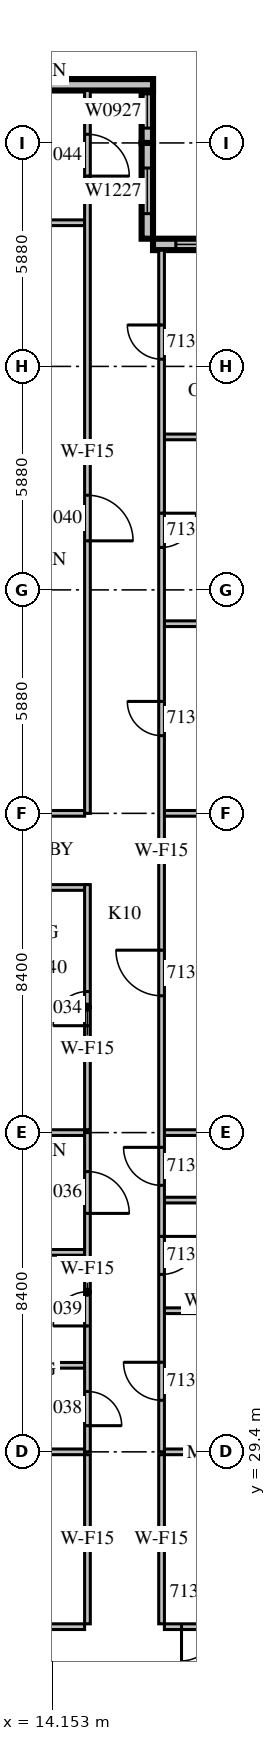
"""IFC4 building model, lengths in metres.
Left out: names, types, materials, properties, quantities, classifications, styles, units other than length and angle.
Written with IfcOpenShell. Run it as: python <this file> out.ifc"""

import sys

from ifc_helpers import new_model, si_unit, direction, frame, frame_2d, origin, place, context, subcontext, project, spatial, rectangle, extrude, source, transform, mapped, element, fill, save


model = new_model("IFC4")
c1 = context("Model", 3, precision=1e-05, world=origin(), true_north=direction((0.0, 1.0)))
c2 = subcontext(c1, "Body", "Model", "MODEL_VIEW")
j1 = project(units=[si_unit("LENGTHUNIT", "METRE"), si_unit("PLANEANGLEUNIT", "RADIAN")], contexts=[c1])
p1 = place(None, origin())
s1 = spatial("IfcSite", under=j1, at=p1, CompositionType="ELEMENT")
p2 = place(p1, origin())
s2 = spatial("IfcBuilding", under=s1, at=p2, CompositionType="ELEMENT")
p3 = place(p2, frame((0.0, 0.0, 65.7)))
s3 = spatial("IfcBuildingStorey", under=s2, at=p3, CompositionType="ELEMENT", Elevation=65.7)
m1 = source(origin(), c2, "Body", "SweptSolid", [
    extrude(rectangle(XDim=4.2, YDim=0.3, at=frame_2d((2.1, 0.0))), origin(), (0.0, 0.0, 1.0), 3.8),
])
p4 = place(p3, frame((21.0, 61.17, 0.0), z_axis=(0.0, 0.0, 1.0), x_axis=(-1.0, 0.0, 0.0)))
e1 = element("IfcWall", 1, at=p4, inside=s3, PredefinedType="STANDARD", context=c2, shape_type="MappedRepresentation", body=[
    mapped(m1, transform((0.0, 0.0, 0.0), scale=1.0)),
])
m2 = source(origin(), c2, "Body", "SweptSolid", [
    extrude(rectangle(XDim=3.0, YDim=2.7, at=frame_2d((1.5, 1.35))), frame((0.0, 0.16, 0.0), z_axis=(0.0, -1.0, 0.0), x_axis=(1.0, 0.0, 0.0)), (0.0, 0.0, 1.0), 0.32),
])
p5 = place(p4, frame((0.6, 0.0, 0.6)))
e2 = element("IfcOpeningElement", 2, at=p5, cuts=e1, PredefinedType="OPENING", context=c2, shape_type="MappedRepresentation", body=[
    mapped(m2, transform((0.0, 0.0, 0.0), scale=1.0)),
])
m3 = source(origin(), c2, "Body", "SweptSolid", [
    extrude(rectangle(XDim=2.52, YDim=0.3, at=frame_2d((1.26, 0.0))), origin(), (0.0, 0.0, 1.0), 3.8),
])
p6 = place(p3, frame((16.65, 61.32, 0.0), z_axis=(0.0, 0.0, 1.0), x_axis=(0.0, 1.0, 0.0)))
e3 = element("IfcWall", 3, at=p6, inside=s3, PredefinedType="STANDARD", context=c2, shape_type="MappedRepresentation", body=[
    mapped(m3, transform((0.0, 0.0, 0.0), scale=1.0)),
])
m4 = source(origin(), c2, "Body", "SweptSolid", [
    extrude(rectangle(XDim=1.2, YDim=2.7, at=frame_2d((0.6, 1.35))), frame((0.0, 0.16, 0.0), z_axis=(0.0, -1.0, 0.0), x_axis=(1.0, 0.0, 0.0)), (0.0, 0.0, 1.0), 0.32),
])
p7 = place(p6, frame((0.66, 0.0, 0.6)))
e4 = element("IfcOpeningElement", 4, at=p7, cuts=e3, PredefinedType="OPENING", context=c2, shape_type="MappedRepresentation", body=[
    mapped(m4, transform((0.0, 0.0, 0.0), scale=1.0)),
])
m5 = source(origin(), c2, "Body", "SweptSolid", [
    extrude(rectangle(XDim=1.68, YDim=0.3, at=frame_2d((0.84, 0.0))), origin(), (0.0, 0.0, 1.0), 3.8),
])
p8 = place(p3, frame((16.65, 63.84, 0.0), z_axis=(0.0, 0.0, 1.0), x_axis=(0.0, 1.0, 0.0)))
e5 = element("IfcWall", 5, at=p8, inside=s3, PredefinedType="STANDARD", context=c2, shape_type="MappedRepresentation", body=[
    mapped(m5, transform((0.0, 0.0, 0.0), scale=1.0)),
])
m6 = source(origin(), c2, "Body", "SweptSolid", [
    extrude(rectangle(XDim=0.9, YDim=2.7, at=frame_2d((0.45, 1.35))), frame((0.0, 0.16, 0.0), z_axis=(0.0, -1.0, 0.0), x_axis=(1.0, 0.0, 0.0)), (0.0, 0.0, 1.0), 0.32),
])
p9 = place(p8, frame((0.39, 0.0, 0.6)))
e6 = element("IfcOpeningElement", 6, at=p9, cuts=e5, PredefinedType="OPENING", context=c2, shape_type="MappedRepresentation", body=[
    mapped(m6, transform((0.0, 0.0, 0.0), scale=1.0)),
])
m7 = source(origin(), c2, "Body", "SweptSolid", [
    extrude(rectangle(XDim=3.15, YDim=0.3, at=frame_2d((1.575, 0.0))), origin(), (0.0, 0.0, 1.0), 3.8),
])
p10 = place(p3, frame((16.8, 65.37, 0.0), z_axis=(0.0, 0.0, 1.0), x_axis=(-1.0, 0.0, 0.0)))
e7 = element("IfcWall", 7, at=p10, inside=s3, PredefinedType="STANDARD", context=c2, shape_type="MappedRepresentation", body=[
    mapped(m7, transform((0.0, 0.0, 0.0), scale=1.0)),
])
m8 = source(origin(), c2, "Body", "SweptSolid", [
    extrude(rectangle(XDim=11.925, YDim=0.15, at=frame_2d((5.963, 0.0))), origin(), (0.0, 0.0, 1.0), 3.8),
])
p11 = place(p3, frame((3.075, 24.8, 0.0), z_axis=(0.0, 0.0, 1.0), x_axis=(1.0, 0.0, 0.0)))
e8 = element("IfcWall", 8, at=p11, inside=s3, PredefinedType="PARTITIONING", context=c2, shape_type="MappedRepresentation", body=[
    mapped(m8, transform((0.0, 0.0, 0.0), scale=1.0)),
])
m9 = source(origin(), c2, "Body", "SweptSolid", [
    extrude(rectangle(XDim=0.9, YDim=2.1, at=frame_2d((0.45, 1.05))), frame((0.0, 0.085, 0.0), z_axis=(0.0, -1.0, 0.0), x_axis=(1.0, 0.0, 0.0)), (0.0, 0.0, 1.0), 0.17),
])
p12 = place(p11, frame((2.062, 0.0, 0.0)))
e9 = element("IfcOpeningElement", 9, at=p12, cuts=e8, PredefinedType="OPENING", context=c2, shape_type="MappedRepresentation", body=[
    mapped(m9, transform((0.0, 0.0, 0.0), scale=1.0)),
])
p13 = place(p11, frame((8.9, 0.0, 0.0)))
e10 = element("IfcOpeningElement", 10, at=p13, cuts=e8, PredefinedType="OPENING", context=c2, shape_type="MappedRepresentation", body=[
    mapped(m9, transform((0.0, 0.0, 0.0), scale=1.0)),
])
m10 = source(origin(), c2, "Body", "SweptSolid", [
    extrude(rectangle(XDim=3.6, YDim=0.15, at=frame_2d((1.8, 0.0))), origin(), (0.0, 0.0, 1.0), 3.8),
])
p14 = place(p3, frame((17.1, 24.8, 0.0), z_axis=(0.0, 0.0, 1.0), x_axis=(1.0, 0.0, 0.0)))
e11 = element("IfcWall", 11, at=p14, inside=s3, PredefinedType="PARTITIONING", context=c2, shape_type="MappedRepresentation", body=[
    mapped(m10, transform((0.0, 0.0, 0.0), scale=1.0)),
])
p15 = place(p14, frame((0.45, 0.0, 0.0)))
e12 = element("IfcOpeningElement", 12, at=p15, cuts=e11, PredefinedType="OPENING", context=c2, shape_type="MappedRepresentation", body=[
    mapped(m9, transform((0.0, 0.0, 0.0), scale=1.0)),
])
m11 = source(origin(), c2, "Body", "SweptSolid", [
    extrude(rectangle(XDim=4.45, YDim=0.15, at=frame_2d((2.225, 0.0))), origin(), (0.0, 0.0, 1.0), 3.8),
])
for number, where, z_axis, x_axis in (
    (13, (15.075, 24.875, 0.0), (0.0, 0.0, 1.0), (0.0, 1.0, 0.0)),
    (14, (17.025, 29.325, 0.0), (0.0, 0.0, 1.0), (0.0, -1.0, 0.0)),
):
    element("IfcWall", number, at=place(p3, frame(where, z_axis=z_axis, x_axis=x_axis)), inside=s3, PredefinedType="PARTITIONING", context=c2, shape_type="MappedRepresentation", body=[
        mapped(m11, transform((0.0, 0.0, 0.0), scale=1.0)),
    ])
m12 = source(origin(), c2, "Body", "SweptSolid", [
    extrude(rectangle(XDim=3.901, YDim=0.15, at=frame_2d((1.95, 0.0))), origin(), (0.0, 0.0, 1.0), 3.8),
])
p16 = place(p3, frame((15.0, 29.4, 0.0), z_axis=(0.0, 0.0, 1.0), x_axis=(-1.0, 0.0, 0.0)))
e15 = element("IfcWall", 15, at=p16, inside=s3, PredefinedType="PARTITIONING", context=c2, shape_type="MappedRepresentation", body=[
    mapped(m12, transform((0.0, 0.0, 0.0), scale=1.0)),
])
m13 = source(origin(), c2, "Body", "SweptSolid", [
    extrude(rectangle(XDim=2.701, YDim=0.15, at=frame_2d((1.351, 0.0))), origin(), (0.0, 0.0, 1.0), 3.8),
])
p17 = place(p3, frame((19.801, 29.4, 0.0), z_axis=(0.0, 0.0, 1.0), x_axis=(-1.0, 0.0, 0.0)))
e16 = element("IfcWall", 16, at=p17, inside=s3, PredefinedType="PARTITIONING", context=c2, shape_type="MappedRepresentation", body=[
    mapped(m13, transform((0.0, 0.0, 0.0), scale=1.0)),
])
m14 = source(origin(), c2, "Body", "SweptSolid", [
    extrude(rectangle(XDim=3.975, YDim=0.15, at=frame_2d((1.988, 0.0))), origin(), (0.0, 0.0, 1.0), 3.8),
])
p18 = place(p3, frame((15.075, 44.25, 0.0), z_axis=(0.0, 0.0, 1.0), x_axis=(-1.0, 0.0, 0.0)))
e17 = element("IfcWall", 17, at=p18, inside=s3, PredefinedType="PARTITIONING", context=c2, shape_type="MappedRepresentation", body=[
    mapped(m14, transform((0.0, 0.0, 0.0), scale=1.0)),
])
m15 = source(origin(), c2, "Body", "SweptSolid", [
    extrude(rectangle(XDim=6.45, YDim=0.15, at=frame_2d((3.225, 0.0))), origin(), (0.0, 0.0, 1.0), 3.8),
])
p19 = place(p3, frame((15.075, 37.875, 0.0), z_axis=(0.0, 0.0, 1.0), x_axis=(0.0, 1.0, 0.0)))
e18 = element("IfcWall", 18, at=p19, inside=s3, PredefinedType="PARTITIONING", context=c2, shape_type="MappedRepresentation", body=[
    mapped(m15, transform((0.0, 0.0, 0.0), scale=1.0)),
])
p20 = place(p19, frame((2.737, 0.0, 0.0)))
e19 = element("IfcOpeningElement", 19, at=p20, cuts=e18, PredefinedType="OPENING", context=c2, shape_type="MappedRepresentation", body=[
    mapped(m9, transform((0.0, 0.0, 0.0), scale=1.0)),
])
m16 = source(origin(), c2, "Body", "SweptSolid", [
    extrude(rectangle(XDim=3.75, YDim=0.15, at=frame_2d((1.875, 0.0))), origin(), (0.0, 0.0, 1.0), 3.8),
])
for number, where, z_axis, x_axis in (
    (20, (15.0, 31.677, 0.0), (0.0, 0.0, 1.0), (-1.0, 0.0, 0.0)),
    (21, (15.0, 34.648, 0.0), (0.0, 0.0, 1.0), (-1.0, 0.0, 0.0)),
    (22, (15.0, 37.8, 0.0), (0.0, 0.0, 1.0), (-1.0, 0.0, 0.0)),
    (23, (15.0, 46.2, 0.0), (0.0, 0.0, 1.0), (-1.0, 0.0, 0.0)),
    (24, (15.0, 61.74, 0.0), (0.0, 0.0, 1.0), (-1.0, 0.0, 0.0)),
):
    element("IfcWall", number, at=place(p3, frame(where, z_axis=z_axis, x_axis=x_axis)), inside=s3, PredefinedType="PARTITIONING", context=c2, shape_type="MappedRepresentation", body=[
        mapped(m16, transform((0.0, 0.0, 0.0), scale=1.0)),
    ])
for number, where, z_axis, x_axis in (
    (25, (17.1, 33.113, 0.0), (0.0, 0.0, 1.0), (1.0, 0.0, 0.0)),
    (26, (17.1, 36.024, 0.0), (0.0, 0.0, 1.0), (1.0, 0.0, 0.0)),
    (27, (17.1, 51.19, 0.0), (0.0, 0.0, 1.0), (1.0, 0.0, 0.0)),
    (28, (17.1, 56.105, 0.0), (0.0, 0.0, 1.0), (1.0, 0.0, 0.0)),
):
    element("IfcWall", number, at=place(p3, frame(where, z_axis=z_axis, x_axis=x_axis)), inside=s3, PredefinedType="PARTITIONING", context=c2, shape_type="MappedRepresentation", body=[
        mapped(m10, transform((0.0, 0.0, 0.0), scale=1.0)),
    ])
for number, where, z_axis, x_axis in (
    (29, (19.801, 37.8, 0.0), (0.0, 0.0, 1.0), (-1.0, 0.0, 0.0)),
    (30, (19.801, 46.2, 0.0), (0.0, 0.0, 1.0), (-1.0, 0.0, 0.0)),
):
    element("IfcWall", number, at=place(p3, frame(where, z_axis=z_axis, x_axis=x_axis)), inside=s3, PredefinedType="PARTITIONING", context=c2, shape_type="MappedRepresentation", body=[
        mapped(m13, transform((0.0, 0.0, 0.0), scale=1.0)),
    ])
m17 = source(origin(), c2, "Body", "SweptSolid", [
    extrude(rectangle(XDim=8.4, YDim=0.15, at=frame_2d((4.2, 0.0))), origin(), (0.0, 0.0, 1.0), 3.8),
])
p21 = place(p3, frame((15.075, 29.4, 0.0), z_axis=(0.0, 0.0, 1.0), x_axis=(0.0, 1.0, 0.0)))
e31 = element("IfcWall", 31, at=p21, inside=s3, PredefinedType="PARTITIONING", context=c2, shape_type="MappedRepresentation", body=[
    mapped(m17, transform((0.0, 0.0, 0.0), scale=1.0)),
])
m18 = source(origin(), c2, "Body", "SweptSolid", [
    extrude(rectangle(XDim=1.1, YDim=2.1, at=frame_2d((0.55, 1.05))), frame((0.0, 0.085, 0.0), z_axis=(0.0, -1.0, 0.0), x_axis=(1.0, 0.0, 0.0)), (0.0, 0.0, 1.0), 0.17),
])
p22 = place(p21, frame((6.274, 0.0, 0.0)))
e32 = element("IfcOpeningElement", 32, at=p22, cuts=e31, PredefinedType="OPENING", context=c2, shape_type="MappedRepresentation", body=[
    mapped(m18, transform((0.0, 0.0, 0.0), scale=1.0)),
])
p23 = place(p21, frame((0.689, 0.0, 0.0)))
e33 = element("IfcOpeningElement", 33, at=p23, cuts=e31, PredefinedType="OPENING", context=c2, shape_type="MappedRepresentation", body=[
    mapped(m9, transform((0.0, 0.0, 0.0), scale=1.0)),
])
p24 = place(p21, frame((3.313, 0.0, 0.0)))
e34 = element("IfcOpeningElement", 34, at=p24, cuts=e31, PredefinedType="OPENING", context=c2, shape_type="MappedRepresentation", body=[
    mapped(m9, transform((0.0, 0.0, 0.0), scale=1.0)),
])
m19 = source(origin(), c2, "Body", "SweptSolid", [
    extrude(rectangle(XDim=19.02, YDim=0.15, at=frame_2d((9.51, 0.0))), origin(), (0.0, 0.0, 1.0), 3.8),
])
p25 = place(p3, frame((15.075, 46.2, 0.0), z_axis=(0.0, 0.0, 1.0), x_axis=(0.0, 1.0, 0.0)))
e35 = element("IfcWall", 35, at=p25, inside=s3, PredefinedType="PARTITIONING", context=c2, shape_type="MappedRepresentation", body=[
    mapped(m19, transform((0.0, 0.0, 0.0), scale=1.0)),
])
m20 = source(origin(), c2, "Body", "SweptSolid", [
    extrude(rectangle(XDim=1.2, YDim=2.1, at=frame_2d((0.6, 1.05))), frame((0.0, 0.085, 0.0), z_axis=(0.0, -1.0, 0.0), x_axis=(1.0, 0.0, 0.0)), (0.0, 0.0, 1.0), 0.17),
])
p26 = place(p25, frame((7.17, 0.0, 0.0)))
e36 = element("IfcOpeningElement", 36, at=p26, cuts=e35, PredefinedType="OPENING", context=c2, shape_type="MappedRepresentation", body=[
    mapped(m20, transform((0.0, 0.0, 0.0), scale=1.0)),
])
p27 = place(p25, frame((16.767, 0.0, 0.0)))
e37 = element("IfcOpeningElement", 37, at=p27, cuts=e35, PredefinedType="OPENING", context=c2, shape_type="MappedRepresentation", body=[
    mapped(m18, transform((0.0, 0.0, 0.0), scale=1.0)),
])
m21 = source(origin(), c2, "Body", "SweptSolid", [
    extrude(rectangle(XDim=31.62, YDim=0.15, at=frame_2d((15.81, 0.0))), origin(), (0.0, 0.0, 1.0), 3.8),
])
p28 = place(p3, frame((17.025, 61.02, 0.0), z_axis=(0.0, 0.0, 1.0), x_axis=(0.0, -1.0, 0.0)))
e38 = element("IfcWall", 38, at=p28, inside=s3, PredefinedType="PARTITIONING", context=c2, shape_type="MappedRepresentation", body=[
    mapped(m21, transform((0.0, 0.0, 0.0), scale=1.0)),
])
m22 = source(origin(), c2, "Body", "SweptSolid", [
    extrude(rectangle(XDim=1.0, YDim=2.1, at=frame_2d((0.5, 1.05))), frame((0.0, 0.085, 0.0), z_axis=(0.0, -1.0, 0.0), x_axis=(1.0, 0.0, 0.0)), (0.0, 0.0, 1.0), 0.17),
])
p29 = place(p28, frame((29.263, 0.0, 0.0)))
e39 = element("IfcOpeningElement", 39, at=p29, cuts=e38, PredefinedType="OPENING", context=c2, shape_type="MappedRepresentation", body=[
    mapped(m22, transform((0.0, 0.0, 0.0), scale=1.0)),
])
p30 = place(p28, frame((25.951, 0.0, 0.0)))
e40 = element("IfcOpeningElement", 40, at=p30, cuts=e38, PredefinedType="OPENING", context=c2, shape_type="MappedRepresentation", body=[
    mapped(m22, transform((0.0, 0.0, 0.0), scale=1.0)),
])
p31 = place(p28, frame((23.608, 0.0, 0.0)))
e41 = element("IfcOpeningElement", 41, at=p31, cuts=e38, PredefinedType="OPENING", context=c2, shape_type="MappedRepresentation", body=[
    mapped(m22, transform((0.0, 0.0, 0.0), scale=1.0)),
])
p32 = place(p28, frame((18.42, 0.0, 0.0)))
e42 = element("IfcOpeningElement", 42, at=p32, cuts=e38, PredefinedType="OPENING", context=c2, shape_type="MappedRepresentation", body=[
    mapped(m20, transform((0.0, 0.0, 0.0), scale=1.0)),
])
p33 = place(p28, frame((11.875, 0.0, 0.0)))
e43 = element("IfcOpeningElement", 43, at=p33, cuts=e38, PredefinedType="OPENING", context=c2, shape_type="MappedRepresentation", body=[
    mapped(m9, transform((0.0, 0.0, 0.0), scale=1.0)),
])
p34 = place(p28, frame((6.923, 0.0, 0.0)))
e44 = element("IfcOpeningElement", 44, at=p34, cuts=e38, PredefinedType="OPENING", context=c2, shape_type="MappedRepresentation", body=[
    mapped(m9, transform((0.0, 0.0, 0.0), scale=1.0)),
])
p35 = place(p28, frame((1.97, 0.0, 0.0)))
e45 = element("IfcOpeningElement", 45, at=p35, cuts=e38, PredefinedType="OPENING", context=c2, shape_type="MappedRepresentation", body=[
    mapped(m9, transform((0.0, 0.0, 0.0), scale=1.0)),
])
m23 = source(origin(), c2, "Body", "SweptSolid", [
    extrude(rectangle(XDim=3.0, YDim=2.7, at=frame_2d((1.5, 1.35))), frame((0.0, 0.03, 0.0), z_axis=(0.0, -1.0, 0.0), x_axis=(1.0, 0.0, 0.0)), (0.0, 0.0, 1.0), 0.06),
])
p36 = place(p5, origin())
e46 = element("IfcWindow", 46, at=p36, inside=s3, PartitioningType="SINGLE_PANEL", PredefinedType="WINDOW", context=c2, shape_type="MappedRepresentation", body=[
    mapped(m23, transform((0.0, 0.0, 0.0), scale=1.0)),
])
fill(e2, e46)
m24 = source(origin(), c2, "Body", "SweptSolid", [
    extrude(rectangle(XDim=1.2, YDim=2.7, at=frame_2d((0.6, 1.35))), frame((0.0, 0.03, 0.0), z_axis=(0.0, -1.0, 0.0), x_axis=(1.0, 0.0, 0.0)), (0.0, 0.0, 1.0), 0.06),
])
p37 = place(p7, origin())
e47 = element("IfcWindow", 47, at=p37, inside=s3, PartitioningType="SINGLE_PANEL", PredefinedType="WINDOW", context=c2, shape_type="MappedRepresentation", body=[
    mapped(m24, transform((0.0, 0.0, 0.0), scale=1.0)),
])
fill(e4, e47)
m25 = source(origin(), c2, "Body", "SweptSolid", [
    extrude(rectangle(XDim=0.9, YDim=2.7, at=frame_2d((0.45, 1.35))), frame((0.0, 0.03, 0.0), z_axis=(0.0, -1.0, 0.0), x_axis=(1.0, 0.0, 0.0)), (0.0, 0.0, 1.0), 0.06),
])
p38 = place(p9, origin())
e48 = element("IfcWindow", 48, at=p38, inside=s3, PartitioningType="SINGLE_PANEL", PredefinedType="WINDOW", context=c2, shape_type="MappedRepresentation", body=[
    mapped(m25, transform((0.0, 0.0, 0.0), scale=1.0)),
])
fill(e6, e48)
m26 = source(origin(), c2, "Body", "SweptSolid", [
    extrude(rectangle(XDim=0.9, YDim=2.1, at=frame_2d((0.45, 1.05))), frame((0.0, 0.025, 0.0), z_axis=(0.0, -1.0, 0.0), x_axis=(1.0, 0.0, 0.0)), (0.0, 0.0, 1.0), 0.05),
])
p39 = place(p15, origin())
e49 = element("IfcDoor", 49, at=p39, inside=s3, OperationType="SINGLE_SWING_RIGHT", PredefinedType="DOOR", context=c2, shape_type="MappedRepresentation", body=[
    mapped(m26, transform((0.0, 0.0, 0.0), scale=1.0)),
])
fill(e12, e49)
p40 = place(p20, origin())
e50 = element("IfcDoor", 50, at=p40, inside=s3, OperationType="SINGLE_SWING_LEFT", PredefinedType="DOOR", context=c2, shape_type="MappedRepresentation", body=[
    mapped(m26, transform((0.0, 0.0, 0.0), scale=1.0)),
])
fill(e19, e50)
m27 = source(origin(), c2, "Body", "SweptSolid", [
    extrude(rectangle(XDim=1.1, YDim=2.1, at=frame_2d((0.55, 1.05))), frame((0.0, 0.025, 0.0), z_axis=(0.0, -1.0, 0.0), x_axis=(1.0, 0.0, 0.0)), (0.0, 0.0, 1.0), 0.05),
])
p41 = place(p22, origin())
e51 = element("IfcDoor", 51, at=p41, inside=s3, OperationType="SINGLE_SWING_RIGHT", PredefinedType="DOOR", context=c2, shape_type="MappedRepresentation", body=[
    mapped(m27, transform((0.0, 0.0, 0.0), scale=1.0)),
])
fill(e32, e51)
p42 = place(p23, origin())
e52 = element("IfcDoor", 52, at=p42, inside=s3, OperationType="SINGLE_SWING_RIGHT", PredefinedType="DOOR", context=c2, shape_type="MappedRepresentation", body=[
    mapped(m26, transform((0.0, 0.0, 0.0), scale=1.0)),
])
fill(e33, e52)
p43 = place(p24, origin())
e53 = element("IfcDoor", 53, at=p43, inside=s3, OperationType="SINGLE_SWING_LEFT", PredefinedType="DOOR", context=c2, shape_type="MappedRepresentation", body=[
    mapped(m26, transform((0.0, 0.0, 0.0), scale=1.0)),
])
fill(e34, e53)
m28 = source(origin(), c2, "Body", "SweptSolid", [
    extrude(rectangle(XDim=1.2, YDim=2.1, at=frame_2d((0.6, 1.05))), frame((0.0, 0.025, 0.0), z_axis=(0.0, -1.0, 0.0), x_axis=(1.0, 0.0, 0.0)), (0.0, 0.0, 1.0), 0.05),
])
p44 = place(p26, origin())
e54 = element("IfcDoor", 54, at=p44, inside=s3, OperationType="SINGLE_SWING_RIGHT", PredefinedType="DOOR", context=c2, shape_type="MappedRepresentation", body=[
    mapped(m28, transform((0.0, 0.0, 0.0), scale=1.0)),
])
fill(e36, e54)
p45 = place(p27, origin())
e55 = element("IfcDoor", 55, at=p45, inside=s3, OperationType="SINGLE_SWING_RIGHT", PredefinedType="DOOR", context=c2, shape_type="MappedRepresentation", body=[
    mapped(m27, transform((0.0, 0.0, 0.0), scale=1.0)),
])
fill(e37, e55)
m29 = source(origin(), c2, "Body", "SweptSolid", [
    extrude(rectangle(XDim=1.0, YDim=2.1, at=frame_2d((0.5, 1.05))), frame((0.0, 0.025, 0.0), z_axis=(0.0, -1.0, 0.0), x_axis=(1.0, 0.0, 0.0)), (0.0, 0.0, 1.0), 0.05),
])
p46 = place(p29, origin())
e56 = element("IfcDoor", 56, at=p46, inside=s3, OperationType="SINGLE_SWING_RIGHT", PredefinedType="DOOR", context=c2, shape_type="MappedRepresentation", body=[
    mapped(m29, transform((0.0, 0.0, 0.0), scale=1.0)),
])
fill(e39, e56)
p47 = place(p30, origin())
e57 = element("IfcDoor", 57, at=p47, inside=s3, OperationType="SINGLE_SWING_LEFT", PredefinedType="DOOR", context=c2, shape_type="MappedRepresentation", body=[
    mapped(m29, transform((0.0, 0.0, 0.0), scale=1.0)),
])
fill(e40, e57)
p48 = place(p31, origin())
e58 = element("IfcDoor", 58, at=p48, inside=s3, OperationType="SINGLE_SWING_RIGHT", PredefinedType="DOOR", context=c2, shape_type="MappedRepresentation", body=[
    mapped(m29, transform((0.0, 0.0, 0.0), scale=1.0)),
])
fill(e41, e58)
p49 = place(p32, origin())
e59 = element("IfcDoor", 59, at=p49, inside=s3, OperationType="SINGLE_SWING_RIGHT", PredefinedType="DOOR", context=c2, shape_type="MappedRepresentation", body=[
    mapped(m28, transform((0.0, 0.0, 0.0), scale=1.0)),
])
fill(e42, e59)
p50 = place(p33, origin())
e60 = element("IfcDoor", 60, at=p50, inside=s3, OperationType="SINGLE_SWING_RIGHT", PredefinedType="DOOR", context=c2, shape_type="MappedRepresentation", body=[
    mapped(m26, transform((0.0, 0.0, 0.0), scale=1.0)),
])
fill(e43, e60)
p51 = place(p34, origin())
e61 = element("IfcDoor", 61, at=p51, inside=s3, OperationType="SINGLE_SWING_LEFT", PredefinedType="DOOR", context=c2, shape_type="MappedRepresentation", body=[
    mapped(m26, transform((0.0, 0.0, 0.0), scale=1.0)),
])
fill(e44, e61)
p52 = place(p35, origin())
e62 = element("IfcDoor", 62, at=p52, inside=s3, OperationType="SINGLE_SWING_RIGHT", PredefinedType="DOOR", context=c2, shape_type="MappedRepresentation", body=[
    mapped(m26, transform((0.0, 0.0, 0.0), scale=1.0)),
])
fill(e45, e62)
save(model, sys.argv[1])
